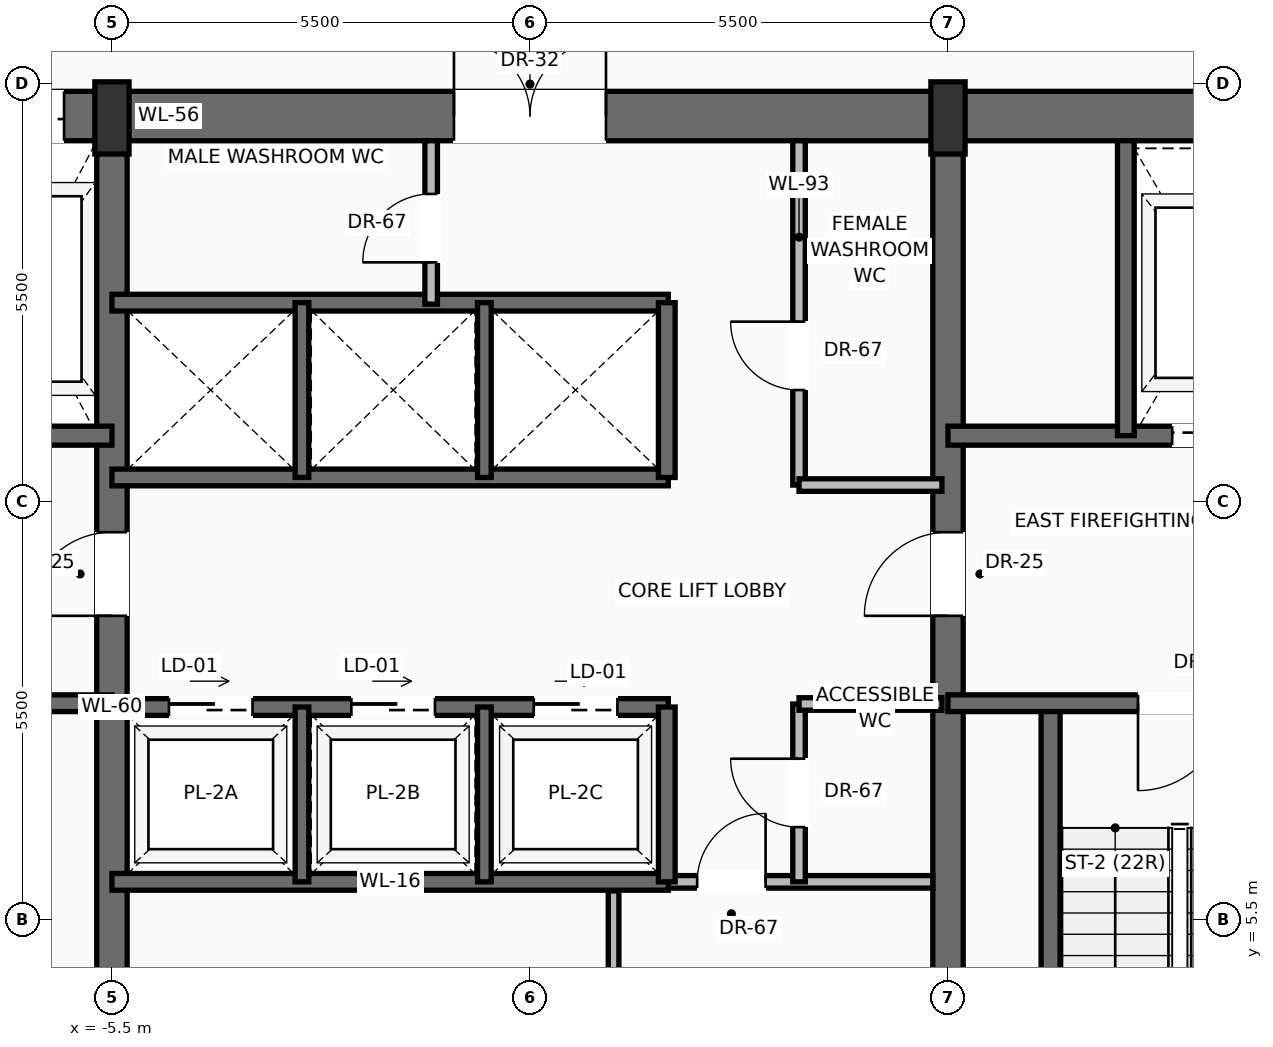
"""IFC4 building model, lengths in metres.
Left out: names, types, materials, properties, quantities, classifications, styles, units other than length and angle.
Written with IfcOpenShell. Run it as: python <this file> out.ifc"""

import sys

from ifc_helpers import new_model, si_unit, direction, frame, frame_2d, origin, origin_2d, place, context, subcontext, project, spatial, rectangle, extrude, source, transform, mapped, element, fill, save


model = new_model("IFC4")
c1 = context("Model", 3, precision=1e-05, world=origin(), true_north=direction((0.0, 1.0)))
c2 = subcontext(c1, "Body", "Model", "MODEL_VIEW")
j1 = project(units=[si_unit("LENGTHUNIT", "METRE"), si_unit("PLANEANGLEUNIT", "RADIAN")], contexts=[c1])
p1 = place(None, origin())
s1 = spatial("IfcSite", under=j1, at=p1, CompositionType="ELEMENT")
p2 = place(p1, origin())
s2 = spatial("IfcBuilding", under=s1, at=p2, CompositionType="ELEMENT")
p3 = place(p2, frame((0.0, 0.0, 162.6)))
s3 = spatial("IfcBuildingStorey", under=s2, at=p3, CompositionType="ELEMENT", Elevation=162.6)
p4 = place(p3, frame((-10.8, 16.075, 0.0), z_axis=(0.0, 0.0, 1.0), x_axis=(1.0, 0.0, 0.0)))
e1 = element("IfcWall", 1, at=p4, inside=s3, PredefinedType="SHEAR", context=c2, shape_type="SweptSolid", body=[
    extrude(rectangle(XDim=21.6, YDim=0.65, at=frame_2d((10.8, 0.0))), origin(), (0.0, 0.0, 1.0), 3.4),
])
p5 = place(p4, frame((3.37, 0.0, 0.0)))
e2 = element("IfcOpeningElement", 2, at=p5, cuts=e1, PredefinedType="OPENING", context=c2, shape_type="SweptSolid", body=[
    extrude(rectangle(XDim=1.3, YDim=2.3, at=frame_2d((0.65, 1.15))), frame((0.0, 0.335, 0.0), z_axis=(0.0, -1.0, 0.0), x_axis=(1.0, 0.0, 0.0)), (0.0, 0.0, 1.0), 0.67),
])
p6 = place(p4, frame((9.8, 0.0, 0.0)))
e3 = element("IfcOpeningElement", 3, at=p6, cuts=e1, PredefinedType="OPENING", context=c2, shape_type="SweptSolid", body=[
    extrude(rectangle(XDim=2.0, YDim=2.4, at=frame_2d((1.0, 1.2))), frame((0.0, 0.335, 0.0), z_axis=(0.0, -1.0, 0.0), x_axis=(1.0, 0.0, 0.0)), (0.0, 0.0, 1.0), 0.67),
])
p7 = place(p3, frame((-5.5, 0.525, 0.0), z_axis=(0.0, 0.0, 1.0), x_axis=(0.0, 1.0, 0.0)))
e4 = element("IfcWall", 4, at=p7, inside=s3, PredefinedType="SHEAR", context=c2, shape_type="SweptSolid", body=[
    extrude(rectangle(XDim=15.55, YDim=0.4, at=frame_2d((7.775, 0.0))), origin(), (0.0, 0.0, 1.0), 3.4),
])
p8 = place(p7, frame((8.975, 0.0, 0.0)))
e5 = element("IfcOpeningElement", 5, at=p8, cuts=e4, PredefinedType="OPENING", context=c2, shape_type="SweptSolid", body=[
    extrude(rectangle(XDim=1.1, YDim=2.2, at=frame_2d((0.55, 1.1))), frame((0.0, 0.21, 0.0), z_axis=(0.0, -1.0, 0.0), x_axis=(1.0, 0.0, 0.0)), (0.0, 0.0, 1.0), 0.42),
])
p9 = place(p3, frame((5.5, 0.525, 0.0), z_axis=(0.0, 0.0, 1.0), x_axis=(0.0, 1.0, 0.0)))
e6 = element("IfcWall", 6, at=p9, inside=s3, PredefinedType="SHEAR", context=c2, shape_type="SweptSolid", body=[
    extrude(rectangle(XDim=15.55, YDim=0.4, at=frame_2d((7.775, 0.0))), origin(), (0.0, 0.0, 1.0), 3.4),
])
p10 = place(p9, frame((8.975, 0.0, 0.0)))
e7 = element("IfcOpeningElement", 7, at=p10, cuts=e6, PredefinedType="OPENING", context=c2, shape_type="SweptSolid", body=[
    extrude(rectangle(XDim=1.1, YDim=2.2, at=frame_2d((0.55, 1.1))), frame((0.0, 0.21, 0.0), z_axis=(0.0, -1.0, 0.0), x_axis=(1.0, 0.0, 0.0)), (0.0, 0.0, 1.0), 0.42),
])
m1 = source(origin(), c2, "Body", "SweptSolid", [
    extrude(rectangle(XDim=0.45, YDim=0.95, at=origin_2d()), origin(), (0.0, 0.0, 1.0), 3.7),
])
for number, where, z_axis, x_axis in (
    (8, (-5.5, 16.05, 0.0), (0.0, 0.0, 1.0), (1.0, 0.0, 0.0)),
    (9, (5.5, 16.05, 0.0), (0.0, 0.0, 1.0), (1.0, 0.0, 0.0)),
):
    element("IfcColumn", number, at=place(p3, frame(where, z_axis=z_axis, x_axis=x_axis)), inside=s3, PredefinedType="PILASTER", context=c2, shape_type="MappedRepresentation", body=[
        mapped(m1, transform((0.0, 0.0, 0.0), scale=1.0)),
    ])
p11 = place(p3, frame((-5.5, 8.35, 0.0), z_axis=(0.0, 0.0, 1.0), x_axis=(-1.0, 0.0, 0.0)))
e10 = element("IfcWall", 10, at=p11, inside=s3, PredefinedType="SOLIDWALL", context=c2, shape_type="SweptSolid", body=[
    extrude(rectangle(XDim=4.65, YDim=0.22, at=frame_2d((2.325, 0.0))), origin(), (0.0, 0.0, 1.0), 3.4),
])
p12 = place(p11, frame((2.5, 0.0, 0.0)))
e11 = element("IfcOpeningElement", 11, at=p12, cuts=e10, PredefinedType="OPENING", context=c2, shape_type="SweptSolid", body=[
    extrude(rectangle(XDim=1.15, YDim=2.2, at=frame_2d((0.575, 1.1))), frame((0.0, 0.12, 0.0), z_axis=(0.0, -1.0, 0.0), x_axis=(1.0, 0.0, 0.0)), (0.0, 0.0, 1.0), 0.24),
])
p13 = place(p3, frame((-5.5, 11.87, 0.0), z_axis=(0.0, 0.0, 1.0), x_axis=(-1.0, 0.0, 0.0)))
e12 = element("IfcWall", 12, at=p13, inside=s3, PredefinedType="SOLIDWALL", context=c2, shape_type="SweptSolid", body=[
    extrude(rectangle(XDim=4.65, YDim=0.25, at=frame_2d((2.325, 0.0))), origin(), (0.0, 0.0, 1.0), 3.4),
])
p14 = place(p13, frame((2.95, 0.0, 0.0)))
e13 = element("IfcOpeningElement", 13, at=p14, cuts=e12, PredefinedType="OPENING", context=c2, shape_type="SweptSolid", body=[
    extrude(rectangle(XDim=1.2, YDim=2.25, at=frame_2d((0.6, 1.125))), frame((0.0, 0.135, 0.0), z_axis=(0.0, -1.0, 0.0), x_axis=(1.0, 0.0, 0.0)), (0.0, 0.0, 1.0), 0.27),
])
p15 = place(p3, frame((6.85, 0.85, 0.0), z_axis=(0.0, 0.0, 1.0), x_axis=(0.0, 1.0, 0.0)))
e14 = element("IfcWall", 14, at=p15, inside=s3, PredefinedType="SOLIDWALL", context=c2, shape_type="SweptSolid", body=[
    extrude(rectangle(XDim=7.5, YDim=0.25, at=frame_2d((3.75, 0.0))), origin(), (0.0, 0.0, 1.0), 3.4),
])
p16 = place(p3, frame((10.15, 8.35, 0.0), z_axis=(0.0, 0.0, 1.0), x_axis=(-1.0, 0.0, 0.0)))
e15 = element("IfcWall", 15, at=p16, inside=s3, PredefinedType="SOLIDWALL", context=c2, shape_type="SweptSolid", body=[
    extrude(rectangle(XDim=4.65, YDim=0.22, at=frame_2d((2.325, 0.0))), origin(), (0.0, 0.0, 1.0), 3.4),
])
p17 = place(p16, frame((1.0, 0.0, 0.0)))
e16 = element("IfcOpeningElement", 16, at=p17, cuts=e15, PredefinedType="OPENING", context=c2, shape_type="SweptSolid", body=[
    extrude(rectangle(XDim=1.15, YDim=2.2, at=frame_2d((0.575, 1.1))), frame((0.0, 0.12, 0.0), z_axis=(0.0, -1.0, 0.0), x_axis=(1.0, 0.0, 0.0)), (0.0, 0.0, 1.0), 0.24),
])
p18 = place(p3, frame((10.15, 11.87, 0.0), z_axis=(0.0, 0.0, 1.0), x_axis=(-1.0, 0.0, 0.0)))
e17 = element("IfcWall", 17, at=p18, inside=s3, PredefinedType="SOLIDWALL", context=c2, shape_type="SweptSolid", body=[
    extrude(rectangle(XDim=4.65, YDim=0.25, at=frame_2d((2.325, 0.0))), origin(), (0.0, 0.0, 1.0), 3.4),
])
p19 = place(p18, frame((0.5, 0.0, 0.0)))
e18 = element("IfcOpeningElement", 18, at=p19, cuts=e17, PredefinedType="OPENING", context=c2, shape_type="SweptSolid", body=[
    extrude(rectangle(XDim=1.2, YDim=2.25, at=frame_2d((0.6, 1.125))), frame((0.0, 0.135, 0.0), z_axis=(0.0, -1.0, 0.0), x_axis=(1.0, 0.0, 0.0)), (0.0, 0.0, 1.0), 0.27),
])
p20 = place(p3, frame((7.84, 11.87, 0.0), z_axis=(0.0, 0.0, 1.0), x_axis=(0.0, 1.0, 0.0)))
e19 = element("IfcWall", 19, at=p20, inside=s3, PredefinedType="SOLIDWALL", context=c2, shape_type="SweptSolid", body=[
    extrude(rectangle(XDim=3.88, YDim=0.22, at=frame_2d((1.94, 0.0))), origin(), (0.0, 0.0, 1.0), 3.4),
])
p21 = place(p3, frame((1.82, 6.0, 0.0), z_axis=(0.0, 0.0, 1.0), x_axis=(1.0, 0.0, 0.0)))
e20 = element("IfcWall", 20, at=p21, inside=s3, PredefinedType="PARTITIONING", context=c2, shape_type="SweptSolid", body=[
    extrude(rectangle(XDim=3.48, YDim=0.165, at=frame_2d((1.74, 0.0))), origin(), (0.0, 0.0, 1.0), 3.392),
])
p22 = place(p21, frame((0.38, 0.0, 0.0)))
e21 = element("IfcOpeningElement", 21, at=p22, cuts=e20, PredefinedType="OPENING", context=c2, shape_type="SweptSolid", body=[
    extrude(rectangle(XDim=0.9, YDim=2.1, at=frame_2d((0.45, 1.05))), frame((0.0, 0.093, 0.0), z_axis=(0.0, -1.0, 0.0), x_axis=(1.0, 0.0, 0.0)), (0.0, 0.0, 1.0), 0.185),
])
p23 = place(p3, frame((1.1, 0.85, 0.0), z_axis=(0.0, 0.0, 1.0), x_axis=(0.0, 1.0, 0.0)))
e22 = element("IfcWall", 22, at=p23, inside=s3, PredefinedType="PARTITIONING", context=c2, shape_type="SweptSolid", body=[
    extrude(rectangle(XDim=5.03, YDim=0.14, at=frame_2d((2.515, 0.0))), origin(), (0.0, 0.0, 1.0), 3.392),
])
p24 = place(p23, frame((2.1, 0.0, 0.0)))
e23 = element("IfcOpeningElement", 23, at=p24, cuts=e22, PredefinedType="OPENING", context=c2, shape_type="SweptSolid", body=[
    extrude(rectangle(XDim=0.9, YDim=2.1, at=frame_2d((0.45, 1.05))), frame((0.0, 0.08, 0.0), z_axis=(0.0, -1.0, 0.0), x_axis=(1.0, 0.0, 0.0)), (0.0, 0.0, 1.0), 0.16),
])
p25 = place(p3, frame((3.54, 6.0, 0.0), z_axis=(0.0, 0.0, 1.0), x_axis=(0.0, 1.0, 0.0)))
e24 = element("IfcWall", 24, at=p25, inside=s3, PredefinedType="PARTITIONING", context=c2, shape_type="SweptSolid", body=[
    extrude(rectangle(XDim=2.34, YDim=0.165, at=frame_2d((1.17, 0.0))), origin(), (0.0, 0.0, 1.0), 3.392),
])
p26 = place(p25, frame((0.72, 0.0, 0.0)))
e25 = element("IfcOpeningElement", 25, at=p26, cuts=e24, PredefinedType="OPENING", context=c2, shape_type="SweptSolid", body=[
    extrude(rectangle(XDim=0.9, YDim=2.1, at=frame_2d((0.45, 1.05))), frame((0.0, 0.093, 0.0), z_axis=(0.0, -1.0, 0.0), x_axis=(1.0, 0.0, 0.0)), (0.0, 0.0, 1.0), 0.185),
])
p27 = place(p3, frame((3.54, 8.34, 0.0), z_axis=(0.0, 0.0, 1.0), x_axis=(1.0, 0.0, 0.0)))
e26 = element("IfcWall", 26, at=p27, inside=s3, PredefinedType="PARTITIONING", context=c2, shape_type="SweptSolid", body=[
    extrude(rectangle(XDim=1.88, YDim=0.165, at=frame_2d((0.94, 0.0))), origin(), (0.0, 0.0, 1.0), 3.392),
])
p28 = place(p3, frame((-5.5, 6.0, 0.0), z_axis=(0.0, 0.0, 1.0), x_axis=(1.0, 0.0, 0.0)))
e27 = element("IfcWall", 27, at=p28, inside=s3, PredefinedType="SOLIDWALL", context=c2, shape_type="SweptSolid", body=[
    extrude(rectangle(XDim=7.32, YDim=0.22, at=frame_2d((3.66, 0.0))), origin(), (0.0, 0.0, 1.0), 3.4),
])
p29 = place(p3, frame((-5.5, 8.3, 0.0), z_axis=(0.0, 0.0, 1.0), x_axis=(1.0, 0.0, 0.0)))
e28 = element("IfcWall", 28, at=p29, inside=s3, PredefinedType="SOLIDWALL", context=c2, shape_type="SweptSolid", body=[
    extrude(rectangle(XDim=7.32, YDim=0.22, at=frame_2d((3.66, 0.0))), origin(), (0.0, 0.0, 1.0), 3.4),
])
p30 = place(p29, frame((0.75, 0.0, 0.0)))
e29 = element("IfcOpeningElement", 29, at=p30, cuts=e28, PredefinedType="OPENING", context=c2, shape_type="SweptSolid", body=[
    extrude(rectangle(XDim=1.1, YDim=2.2, at=frame_2d((0.55, 1.1))), frame((0.0, 0.12, 0.0), z_axis=(0.0, -1.0, 0.0), x_axis=(1.0, 0.0, 0.0)), (0.0, 0.0, 1.0), 0.24),
])
p31 = place(p29, frame((3.15, 0.0, 0.0)))
e30 = element("IfcOpeningElement", 30, at=p31, cuts=e28, PredefinedType="OPENING", context=c2, shape_type="SweptSolid", body=[
    extrude(rectangle(XDim=1.1, YDim=2.2, at=frame_2d((0.55, 1.1))), frame((0.0, 0.12, 0.0), z_axis=(0.0, -1.0, 0.0), x_axis=(1.0, 0.0, 0.0)), (0.0, 0.0, 1.0), 0.24),
])
p32 = place(p29, frame((5.55, 0.0, 0.0)))
e31 = element("IfcOpeningElement", 31, at=p32, cuts=e28, PredefinedType="OPENING", context=c2, shape_type="SweptSolid", body=[
    extrude(rectangle(XDim=1.1, YDim=2.2, at=frame_2d((0.55, 1.1))), frame((0.0, 0.12, 0.0), z_axis=(0.0, -1.0, 0.0), x_axis=(1.0, 0.0, 0.0)), (0.0, 0.0, 1.0), 0.24),
])
p33 = place(p3, frame((1.8, 6.0, 0.0), z_axis=(0.0, 0.0, 1.0), x_axis=(0.0, 1.0, 0.0)))
e32 = element("IfcWall", 32, at=p33, inside=s3, PredefinedType="SOLIDWALL", context=c2, shape_type="SweptSolid", body=[
    extrude(rectangle(XDim=2.3, YDim=0.22, at=frame_2d((1.15, 0.0))), origin(), (0.0, 0.0, 1.0), 3.4),
])
for number, where, z_axis, x_axis in (
    (33, (-3.0, 6.0, 0.0), (0.0, 0.0, 1.0), (0.0, 1.0, 0.0)),
    (34, (-0.6, 6.0, 0.0), (0.0, 0.0, 1.0), (0.0, 1.0, 0.0)),
):
    element("IfcWall", number, at=place(p3, frame(where, z_axis=z_axis, x_axis=x_axis)), inside=s3, PredefinedType="SOLIDWALL", context=c2, shape_type="SweptSolid", body=[
        extrude(rectangle(XDim=2.3, YDim=0.18, at=frame_2d((1.15, 0.0))), origin(), (0.0, 0.0, 1.0), 3.4),
    ])
for number, where, z_axis, x_axis in (
    (35, (-5.5, 11.32, 0.0), (0.0, 0.0, 1.0), (1.0, 0.0, 0.0)),
    (36, (-5.5, 13.62, 0.0), (0.0, 0.0, 1.0), (1.0, 0.0, 0.0)),
):
    element("IfcWall", number, at=place(p3, frame(where, z_axis=z_axis, x_axis=x_axis)), inside=s3, PredefinedType="SOLIDWALL", context=c2, shape_type="SweptSolid", body=[
        extrude(rectangle(XDim=7.32, YDim=0.22, at=frame_2d((3.66, 0.0))), origin(), (0.0, 0.0, 1.0), 3.4),
    ])
p34 = place(p3, frame((1.8, 11.32, 0.0), z_axis=(0.0, 0.0, 1.0), x_axis=(0.0, 1.0, 0.0)))
e37 = element("IfcWall", 37, at=p34, inside=s3, PredefinedType="SOLIDWALL", context=c2, shape_type="SweptSolid", body=[
    extrude(rectangle(XDim=2.3, YDim=0.22, at=frame_2d((1.15, 0.0))), origin(), (0.0, 0.0, 1.0), 3.4),
])
for number, where, z_axis, x_axis in (
    (38, (-3.0, 11.32, 0.0), (0.0, 0.0, 1.0), (0.0, 1.0, 0.0)),
    (39, (-0.6, 11.32, 0.0), (0.0, 0.0, 1.0), (0.0, 1.0, 0.0)),
):
    element("IfcWall", number, at=place(p3, frame(where, z_axis=z_axis, x_axis=x_axis)), inside=s3, PredefinedType="SOLIDWALL", context=c2, shape_type="SweptSolid", body=[
        extrude(rectangle(XDim=2.3, YDim=0.18, at=frame_2d((1.15, 0.0))), origin(), (0.0, 0.0, 1.0), 3.4),
    ])
p35 = place(p3, frame((-1.3, 13.6, 0.0), z_axis=(0.0, 0.0, 1.0), x_axis=(0.0, 1.0, 0.0)))
e40 = element("IfcWall", 40, at=p35, inside=s3, PredefinedType="PARTITIONING", context=c2, shape_type="SweptSolid", body=[
    extrude(rectangle(XDim=2.15, YDim=0.165, at=frame_2d((1.075, 0.0))), origin(), (0.0, 0.0, 1.0), 3.392),
])
p36 = place(p35, frame((0.55, 0.0, 0.0)))
e41 = element("IfcOpeningElement", 41, at=p36, cuts=e40, PredefinedType="OPENING", context=c2, shape_type="SweptSolid", body=[
    extrude(rectangle(XDim=0.9, YDim=2.1, at=frame_2d((0.45, 1.05))), frame((0.0, 0.093, 0.0), z_axis=(0.0, -1.0, 0.0), x_axis=(1.0, 0.0, 0.0)), (0.0, 0.0, 1.0), 0.185),
])
p37 = place(p3, frame((3.54, 11.22, 0.0), z_axis=(0.0, 0.0, 1.0), x_axis=(0.0, 1.0, 0.0)))
e42 = element("IfcWall", 42, at=p37, inside=s3, PredefinedType="PARTITIONING", context=c2, shape_type="SweptSolid", body=[
    extrude(rectangle(XDim=4.53, YDim=0.165, at=frame_2d((2.265, 0.0))), origin(), (0.0, 0.0, 1.0), 3.392),
])
p38 = place(p37, frame((1.25, 0.0, 0.0)))
e43 = element("IfcOpeningElement", 43, at=p38, cuts=e42, PredefinedType="OPENING", context=c2, shape_type="SweptSolid", body=[
    extrude(rectangle(XDim=0.9, YDim=2.1, at=frame_2d((0.45, 1.05))), frame((0.0, 0.093, 0.0), z_axis=(0.0, -1.0, 0.0), x_axis=(1.0, 0.0, 0.0)), (0.0, 0.0, 1.0), 0.185),
])
p39 = place(p3, frame((3.54, 11.22, 0.0), z_axis=(0.0, 0.0, 1.0), x_axis=(1.0, 0.0, 0.0)))
e44 = element("IfcWall", 44, at=p39, inside=s3, PredefinedType="PARTITIONING", context=c2, shape_type="SweptSolid", body=[
    extrude(rectangle(XDim=1.88, YDim=0.165, at=frame_2d((0.94, 0.0))), origin(), (0.0, 0.0, 1.0), 3.392),
])
m2 = source(origin(), c2, "Body", "SweptSolid", [
    extrude(rectangle(XDim=1.1, YDim=2.2, at=frame_2d((0.55, 1.1))), frame((0.0, 0.025, 0.0), z_axis=(0.0, -1.0, 0.0), x_axis=(1.0, 0.0, 0.0)), (0.0, 0.0, 1.0), 0.05),
])
p40 = place(p8, origin())
e45 = element("IfcDoor", 45, at=p40, inside=s3, OperationType="SINGLE_SWING_LEFT", PredefinedType="DOOR", context=c2, shape_type="MappedRepresentation", body=[
    mapped(m2, transform((0.0, 0.0, 0.0), scale=1.0)),
])
fill(e5, e45)
m3 = source(origin(), c2, "Body", "SweptSolid", [
    extrude(rectangle(XDim=1.3, YDim=2.3, at=frame_2d((0.65, 1.15))), frame((0.0, 0.025, 0.0), z_axis=(0.0, -1.0, 0.0), x_axis=(1.0, 0.0, 0.0)), (0.0, 0.0, 1.0), 0.05),
])
p41 = place(p5, origin())
e46 = element("IfcDoor", 46, at=p41, inside=s3, OperationType="SLIDING_TO_RIGHT", PredefinedType="DOOR", context=c2, shape_type="MappedRepresentation", body=[
    mapped(m3, transform((0.0, 0.0, 0.0), scale=1.0)),
])
fill(e2, e46)
m4 = source(origin(), c2, "Body", "SweptSolid", [
    extrude(rectangle(XDim=1.15, YDim=2.2, at=frame_2d((0.575, 1.1))), frame((0.0, 0.025, 0.0), z_axis=(0.0, -1.0, 0.0), x_axis=(1.0, 0.0, 0.0)), (0.0, 0.0, 1.0), 0.05),
])
p42 = place(p17, origin())
e47 = element("IfcDoor", 47, at=p42, inside=s3, OperationType="SINGLE_SWING_RIGHT", PredefinedType="DOOR", context=c2, shape_type="MappedRepresentation", body=[
    mapped(m4, transform((0.0, 0.0, 0.0), scale=1.0)),
])
fill(e16, e47)
p43 = place(p10, origin())
e48 = element("IfcDoor", 48, at=p43, inside=s3, OperationType="SINGLE_SWING_LEFT", PredefinedType="DOOR", context=c2, shape_type="MappedRepresentation", body=[
    mapped(m2, transform((0.0, 0.0, 0.0), scale=1.0)),
])
fill(e7, e48)
m5 = source(origin(), c2, "Body", "SweptSolid", [
    extrude(rectangle(XDim=1.2, YDim=2.25, at=frame_2d((0.6, 1.125))), frame((0.0, 0.025, 0.0), z_axis=(0.0, -1.0, 0.0), x_axis=(1.0, 0.0, 0.0)), (0.0, 0.0, 1.0), 0.05),
])
p44 = place(p19, origin())
e49 = element("IfcDoor", 49, at=p44, inside=s3, OperationType="SLIDING_TO_RIGHT", PredefinedType="DOOR", context=c2, shape_type="MappedRepresentation", body=[
    mapped(m5, transform((0.0, 0.0, 0.0), scale=1.0)),
])
fill(e18, e49)
m6 = source(origin(), c2, "Body", "SweptSolid", [
    extrude(rectangle(XDim=2.0, YDim=2.4, at=frame_2d((1.0, 1.2))), frame((0.0, 0.025, 0.0), z_axis=(0.0, -1.0, 0.0), x_axis=(1.0, 0.0, 0.0)), (0.0, 0.0, 1.0), 0.05),
])
p45 = place(p6, origin())
e50 = element("IfcDoor", 50, at=p45, inside=s3, OperationType="DOUBLE_DOOR_SINGLE_SWING", PredefinedType="DOOR", context=c2, shape_type="MappedRepresentation", body=[
    mapped(m6, transform((0.0, 0.0, 0.0), scale=1.0)),
])
fill(e3, e50)
m7 = source(origin(), c2, "Body", "SweptSolid", [
    extrude(rectangle(XDim=0.9, YDim=2.1, at=frame_2d((0.45, 1.05))), frame((0.0, 0.025, 0.0), z_axis=(0.0, -1.0, 0.0), x_axis=(1.0, 0.0, 0.0)), (0.0, 0.0, 1.0), 0.05),
])
p46 = place(p22, origin())
e51 = element("IfcDoor", 51, at=p46, inside=s3, OperationType="SINGLE_SWING_RIGHT", PredefinedType="DOOR", context=c2, shape_type="MappedRepresentation", body=[
    mapped(m7, transform((0.0, 0.0, 0.0), scale=1.0)),
])
fill(e21, e51)
p47 = place(p26, origin())
e52 = element("IfcDoor", 52, at=p47, inside=s3, OperationType="SINGLE_SWING_RIGHT", PredefinedType="DOOR", context=c2, shape_type="MappedRepresentation", body=[
    mapped(m7, transform((0.0, 0.0, 0.0), scale=1.0)),
])
fill(e25, e52)
m8 = source(origin(), c2, "Body", "SweptSolid", [
    extrude(rectangle(XDim=1.1, YDim=2.2, at=frame_2d((0.55, 1.1))), frame((0.0, 0.025, 0.0), z_axis=(0.0, -1.0, 0.0), x_axis=(1.0, 0.0, 0.0)), (0.0, 0.0, 1.0), 0.05),
])
p48 = place(p30, origin())
e53 = element("IfcDoor", 53, at=p48, inside=s3, OperationType="SLIDING_TO_LEFT", PredefinedType="DOOR", context=c2, shape_type="MappedRepresentation", body=[
    mapped(m8, transform((0.0, 0.0, 0.0), scale=1.0)),
])
fill(e29, e53)
p49 = place(p31, origin())
e54 = element("IfcDoor", 54, at=p49, inside=s3, OperationType="SLIDING_TO_LEFT", PredefinedType="DOOR", context=c2, shape_type="MappedRepresentation", body=[
    mapped(m8, transform((0.0, 0.0, 0.0), scale=1.0)),
])
fill(e30, e54)
p50 = place(p32, origin())
e55 = element("IfcDoor", 55, at=p50, inside=s3, OperationType="SLIDING_TO_LEFT", PredefinedType="DOOR", context=c2, shape_type="MappedRepresentation", body=[
    mapped(m8, transform((0.0, 0.0, 0.0), scale=1.0)),
])
fill(e31, e55)
p51 = place(p36, origin())
e56 = element("IfcDoor", 56, at=p51, inside=s3, OperationType="SINGLE_SWING_LEFT", PredefinedType="DOOR", context=c2, shape_type="MappedRepresentation", body=[
    mapped(m7, transform((0.0, 0.0, 0.0), scale=1.0)),
])
fill(e41, e56)
p52 = place(p38, origin())
e57 = element("IfcDoor", 57, at=p52, inside=s3, OperationType="SINGLE_SWING_RIGHT", PredefinedType="DOOR", context=c2, shape_type="MappedRepresentation", body=[
    mapped(m7, transform((0.0, 0.0, 0.0), scale=1.0)),
])
fill(e43, e57)
save(model, sys.argv[1])
